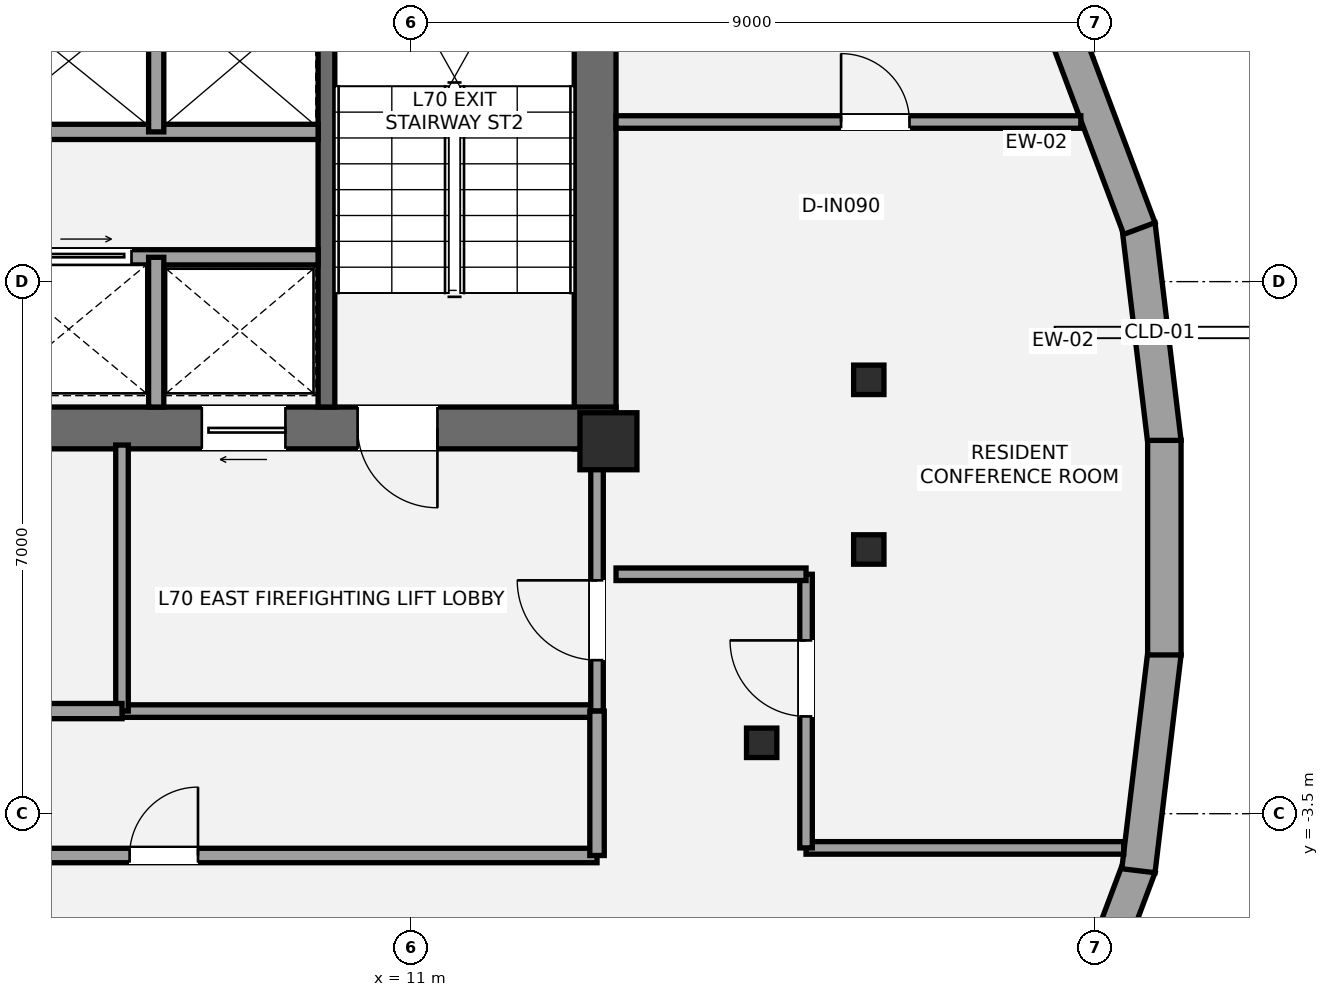
"""IFC4 building model, lengths in metres.
Left out: names, types, materials, properties, quantities, classifications, styles, units other than length and angle.
Written with IfcOpenShell. Run it as: python <this file> out.ifc"""

import sys

from ifc_helpers import new_model, si_unit, direction, frame, frame_2d, origin, origin_2d, place, context, subcontext, project, spatial, rectangle, i_section, extrude, element, fill, save


model = new_model("IFC4")
c1 = context("Model", 3, precision=1e-05, world=origin(), true_north=direction((0.0, 1.0)))
c2 = subcontext(c1, "Body", "Model", "MODEL_VIEW")
j1 = project(units=[si_unit("LENGTHUNIT", "METRE"), si_unit("PLANEANGLEUNIT", "RADIAN")], contexts=[c1])
p1 = place(None, origin())
s1 = spatial("IfcSite", under=j1, at=p1, CompositionType="ELEMENT")
p2 = place(p1, origin())
s2 = spatial("IfcBuilding", under=s1, at=p2, CompositionType="ELEMENT")
p3 = place(p2, frame((0.0, 0.0, 247.8)))
s3 = spatial("IfcBuildingStorey", under=s2, at=p3, CompositionType="ELEMENT", Elevation=247.8)
p4 = place(p3, frame((13.425, 1.3, 0.0), z_axis=(0.0, 0.0, 1.0), x_axis=(0.0, 1.0, 0.0)))
e1 = element("IfcWall", 1, at=p4, inside=s3, PredefinedType="SHEAR", context=c2, shape_type="SweptSolid", body=[
    extrude(rectangle(XDim=8.25, YDim=0.55, at=frame_2d((4.125, 0.0))), origin(), (0.0, 0.0, 1.0), 3.15),
])
p5 = place(p3, frame((13.7, 1.575, 0.0), z_axis=(0.0, 0.0, 1.0), x_axis=(-1.0, 0.0, 0.0)))
e2 = element("IfcWall", 2, at=p5, inside=s3, PredefinedType="SHEAR", context=c2, shape_type="SweptSolid", body=[
    extrude(rectangle(XDim=8.775, YDim=0.55, at=frame_2d((4.387, 0.0))), origin(), (0.0, 0.0, 1.0), 3.15),
])
p6 = place(p5, frame((2.35, 0.0, 0.0)))
e3 = element("IfcOpeningElement", 3, at=p6, cuts=e2, PredefinedType="OPENING", context=c2, shape_type="SweptSolid", body=[
    extrude(rectangle(XDim=1.05, YDim=2.15, at=frame_2d((0.525, 1.075))), frame((0.0, 0.285, 0.0), z_axis=(0.0, -1.0, 0.0), x_axis=(1.0, 0.0, 0.0)), (0.0, 0.0, 1.0), 0.57),
])
p7 = place(p5, frame((4.35, 0.0, 0.0)))
e4 = element("IfcOpeningElement", 4, at=p7, cuts=e2, PredefinedType="OPENING", context=c2, shape_type="SweptSolid", body=[
    extrude(rectangle(XDim=1.1, YDim=2.2, at=frame_2d((0.55, 1.1))), frame((0.0, 0.285, 0.0), z_axis=(0.0, -1.0, 0.0), x_axis=(1.0, 0.0, 0.0)), (0.0, 0.0, 1.0), 0.57),
])
p8 = place(p3, frame((9.89, 1.85, 0.0), z_axis=(0.0, 0.0, 1.0), x_axis=(0.0, 1.0, 0.0)))
e5 = element("IfcWall", 5, at=p8, inside=s3, PredefinedType="SHEAR", context=c2, shape_type="SweptSolid", body=[
    extrude(rectangle(XDim=7.15, YDim=0.22, at=frame_2d((3.575, 0.0))), origin(), (0.0, 0.0, 1.0), 3.15),
])
p9 = place(p3, frame((13.6, 1.4, 0.0), z_axis=(0.0, 0.0, 1.0), x_axis=(1.0, 0.0, 0.0)))
e6 = element("IfcColumn", 6, at=p9, inside=s3, PredefinedType="PILASTER", context=c2, shape_type="SweptSolid", body=[
    extrude(rectangle(XDim=0.75, YDim=0.75, at=origin_2d()), origin(), (0.0, 0.0, 1.0), 3.15),
])
for number, where, z_axis, x_axis in (
    (7, (17.026, 2.208, 0.0), (0.0, 0.0, 1.0), (1.0, 0.0, 0.0)),
    (8, (15.616, -2.567, 0.0), (0.0, 0.0, 1.0), (1.0, 0.0, 0.0)),
    (9, (17.026, -0.024, 0.0), (0.0, 0.0, 1.0), (1.0, 0.0, 0.0)),
):
    element("IfcColumn", number, at=place(p3, frame(where, z_axis=z_axis, x_axis=x_axis)), inside=s3, PredefinedType="COLUMN", context=c2, shape_type="SweptSolid", body=[
        extrude(i_section(OverallWidth=0.399, OverallDepth=0.387, WebThickness=0.021, FlangeThickness=0.033, at=origin_2d()), origin(), (0.0, 0.0, 1.0), 3.15),
    ])
p10 = place(p3, frame((20.573, 4.25, 0.0), z_axis=(0.0, 0.0, 1.0), x_axis=(0.118878304978, -0.992908831971, 0.0)))
e10 = element("IfcWall", 10, at=p10, inside=s3, PredefinedType="STANDARD", context=c2, shape_type="SweptSolid", body=[
    extrude(rectangle(XDim=2.885, YDim=0.44, at=frame_2d((1.443, 0.0))), origin(), (0.0, 0.0, 1.0), 2.336),
])
for number, where, z_axis, x_axis in (
    (11, (19.508, 7.067, 0.0), (0.0, 0.0, 1.0), (0.352, -0.936, 0.0)),
    (12, (20.586, -4.199, 0.0), (0.0, 0.0, 1.0), (-0.352, -0.936, 0.0)),
):
    element("IfcWall", number, at=place(p3, frame(where, z_axis=z_axis, x_axis=x_axis)), inside=s3, PredefinedType="STANDARD", context=c2, shape_type="SweptSolid", body=[
        extrude(rectangle(XDim=3.064, YDim=0.44, at=frame_2d((1.532, 0.0))), origin(), (0.0, 0.0, 1.0), 2.336),
    ])
p11 = place(p3, frame((20.916, -1.385, 0.0), z_axis=(0.0, 0.0, 1.0), x_axis=(-0.118878304978, -0.992908831971, 0.0)))
e13 = element("IfcWall", 13, at=p11, inside=s3, PredefinedType="STANDARD", context=c2, shape_type="SweptSolid", body=[
    extrude(rectangle(XDim=2.885, YDim=0.44, at=frame_2d((1.443, 0.0))), origin(), (0.0, 0.0, 1.0), 2.336),
])
p12 = place(p3, frame((20.914, 1.411, 0.0), z_axis=(0.0, 0.0, 1.0), x_axis=(0.0, -1.0, 0.0)))
e14 = element("IfcWall", 14, at=p12, inside=s3, PredefinedType="STANDARD", context=c2, shape_type="SweptSolid", body=[
    extrude(rectangle(XDim=2.823, YDim=0.44, at=frame_2d((1.411, 0.0))), origin(), (0.0, 0.0, 1.0), 2.336),
])
p13 = place(p3, frame((7.2, -2.15, 0.0), z_axis=(0.0, 0.0, 1.0), x_axis=(1.0, 0.0, 0.0)))
e15 = element("IfcWall", 15, at=p13, inside=s3, PredefinedType="PARTITIONING", context=c2, shape_type="SweptSolid", body=[
    extrude(rectangle(XDim=6.25, YDim=0.165, at=frame_2d((3.125, 0.0))), origin(), (0.0, 0.0, 1.0), 2.97),
])
p14 = place(p3, frame((7.2, -2.15, 0.0), z_axis=(0.0, 0.0, 1.0), x_axis=(0.0, 1.0, 0.0)))
e16 = element("IfcWall", 16, at=p14, inside=s3, PredefinedType="PARTITIONING", context=c2, shape_type="SweptSolid", body=[
    extrude(rectangle(XDim=3.5, YDim=0.165, at=frame_2d((1.75, 0.0))), origin(), (0.0, 0.0, 1.0), 2.423),
])
p15 = place(p3, frame((13.45, -2.15, 0.0), z_axis=(0.0, 0.0, 1.0), x_axis=(0.0, 1.0, 0.0)))
e17 = element("IfcWall", 17, at=p15, inside=s3, PredefinedType="PARTITIONING", context=c2, shape_type="SweptSolid", body=[
    extrude(rectangle(XDim=3.5, YDim=0.165, at=frame_2d((1.75, 0.0))), origin(), (0.0, 0.0, 1.0), 2.423),
])
p16 = place(p15, frame((0.67, 0.0, 0.0)))
e18 = element("IfcOpeningElement", 18, at=p16, cuts=e17, PredefinedType="OPENING", context=c2, shape_type="SweptSolid", body=[
    extrude(rectangle(XDim=1.05, YDim=2.15, at=frame_2d((0.525, 1.075))), frame((0.0, 0.093, 0.0), z_axis=(0.0, -1.0, 0.0), x_axis=(1.0, 0.0, 0.0)), (0.0, 0.0, 1.0), 0.185),
])
p17 = place(p3, frame((4.95, -2.15, 0.0), z_axis=(0.0, 0.0, 1.0), x_axis=(1.0, 0.0, 0.0)))
e19 = element("IfcWall", 19, at=p17, inside=s3, PredefinedType="SOLIDWALL", context=c2, shape_type="SweptSolid", body=[
    extrude(rectangle(XDim=2.25, YDim=0.2, at=frame_2d((1.125, 0.0))), origin(), (0.0, 0.0, 1.0), 2.97),
])
p18 = place(p3, frame((5.475, 3.82, 0.0), z_axis=(0.0, 0.0, 1.0), x_axis=(1.0, 0.0, 0.0)))
e20 = element("IfcWall", 20, at=p18, inside=s3, PredefinedType="SOLIDWALL", context=c2, shape_type="SweptSolid", body=[
    extrude(rectangle(XDim=4.305, YDim=0.2, at=frame_2d((2.152, 0.0))), origin(), (0.0, 0.0, 1.0), 2.97),
])
p19 = place(p18, frame((0.65, 0.0, 0.0)))
e21 = element("IfcOpeningElement", 21, at=p19, cuts=e20, PredefinedType="OPENING", context=c2, shape_type="SweptSolid", body=[
    extrude(rectangle(XDim=1.2, YDim=2.2, at=frame_2d((0.6, 1.1))), frame((0.0, 0.11, 0.0), z_axis=(0.0, -1.0, 0.0), x_axis=(1.0, 0.0, 0.0)), (0.0, 0.0, 1.0), 0.22),
])
p20 = place(p3, frame((7.65, 1.85, 0.0), z_axis=(0.0, 0.0, 1.0), x_axis=(0.0, 1.0, 0.0)))
e22 = element("IfcWall", 22, at=p20, inside=s3, PredefinedType="SOLIDWALL", context=c2, shape_type="SweptSolid", body=[
    extrude(rectangle(XDim=1.97, YDim=0.2, at=frame_2d((0.985, 0.0))), origin(), (0.0, 0.0, 1.0), 2.97),
])
p21 = place(p3, frame((5.475, 5.47, 0.0), z_axis=(0.0, 0.0, 1.0), x_axis=(1.0, 0.0, 0.0)))
e23 = element("IfcWall", 23, at=p21, inside=s3, PredefinedType="SOLIDWALL", context=c2, shape_type="SweptSolid", body=[
    extrude(rectangle(XDim=4.305, YDim=0.2, at=frame_2d((2.152, 0.0))), origin(), (0.0, 0.0, 1.0), 2.97),
])
p22 = place(p3, frame((7.65, 5.47, 0.0), z_axis=(0.0, 0.0, 1.0), x_axis=(0.0, 1.0, 0.0)))
e24 = element("IfcWall", 24, at=p22, inside=s3, PredefinedType="SOLIDWALL", context=c2, shape_type="SweptSolid", body=[
    extrude(rectangle(XDim=1.86, YDim=0.2, at=frame_2d((0.93, 0.0))), origin(), (0.0, 0.0, 1.0), 2.97),
])
p23 = place(p3, frame((2.1, -4.05, 0.0), z_axis=(0.0, 0.0, 1.0), x_axis=(1.0, 0.0, 0.0)))
e25 = element("IfcWall", 25, at=p23, inside=s3, PredefinedType="PLUMBINGWALL", context=c2, shape_type="SweptSolid", body=[
    extrude(rectangle(XDim=11.35, YDim=0.19, at=frame_2d((5.675, 0.0))), origin(), (0.0, 0.0, 1.0), 2.357),
])
p24 = place(p23, frame((5.2, 0.0, 0.0)))
e26 = element("IfcOpeningElement", 26, at=p24, cuts=e25, PredefinedType="OPENING", context=c2, shape_type="SweptSolid", body=[
    extrude(rectangle(XDim=0.9, YDim=2.1, at=frame_2d((0.45, 1.05))), frame((0.0, 0.105, 0.0), z_axis=(0.0, -1.0, 0.0), x_axis=(1.0, 0.0, 0.0)), (0.0, 0.0, 1.0), 0.21),
])
p25 = place(p3, frame((13.45, -4.05, 0.0), z_axis=(0.0, 0.0, 1.0), x_axis=(0.0, 1.0, 0.0)))
e27 = element("IfcWall", 27, at=p25, inside=s3, PredefinedType="PLUMBINGWALL", context=c2, shape_type="SweptSolid", body=[
    extrude(rectangle(XDim=1.9, YDim=0.19, at=frame_2d((0.95, 0.0))), origin(), (0.0, 0.0, 1.0), 2.423),
])
p26 = place(p3, frame((16.2, -3.95, 0.0), z_axis=(0.0, 0.0, 1.0), x_axis=(1.0, 0.0, 0.0)))
e28 = element("IfcWall", 28, at=p26, inside=s3, PredefinedType="PARTITIONING", context=c2, shape_type="SweptSolid", body=[
    extrude(rectangle(XDim=4.179, YDim=0.165, at=frame_2d((2.09, 0.0))), origin(), (0.0, 0.0, 1.0), 2.423),
])
p27 = place(p3, frame((16.2, -3.95, 0.0), z_axis=(0.0, 0.0, 1.0), x_axis=(0.0, 1.0, 0.0)))
e29 = element("IfcWall", 29, at=p27, inside=s3, PredefinedType="PARTITIONING", context=c2, shape_type="SweptSolid", body=[
    extrude(rectangle(XDim=3.6, YDim=0.165, at=frame_2d((1.8, 0.0))), origin(), (0.0, 0.0, 1.0), 2.357),
])
p28 = place(p27, frame((1.73, 0.0, 0.0)))
e30 = element("IfcOpeningElement", 30, at=p28, cuts=e29, PredefinedType="OPENING", context=c2, shape_type="SweptSolid", body=[
    extrude(rectangle(XDim=1.0, YDim=2.15, at=frame_2d((0.5, 1.075))), frame((0.0, 0.093, 0.0), z_axis=(0.0, -1.0, 0.0), x_axis=(1.0, 0.0, 0.0)), (0.0, 0.0, 1.0), 0.185),
])
p29 = place(p3, frame((13.7, -0.35, 0.0), z_axis=(0.0, 0.0, 1.0), x_axis=(1.0, 0.0, 0.0)))
e31 = element("IfcWall", 31, at=p29, inside=s3, PredefinedType="PARTITIONING", context=c2, shape_type="SweptSolid", body=[
    extrude(rectangle(XDim=2.5, YDim=0.165, at=frame_2d((1.25, 0.0))), origin(), (0.0, 0.0, 1.0), 2.423),
])
p30 = place(p3, frame((13.7, 5.6, 0.0), z_axis=(0.0, 0.0, 1.0), x_axis=(1.0, 0.0, 0.0)))
e32 = element("IfcWall", 32, at=p30, inside=s3, PredefinedType="PARTITIONING", context=c2, shape_type="SweptSolid", body=[
    extrude(rectangle(XDim=6.115, YDim=0.165, at=frame_2d((3.058, 0.0))), origin(), (0.0, 0.0, 1.0), 2.423),
])
p31 = place(p30, frame((2.961, 0.0, 0.0)))
e33 = element("IfcOpeningElement", 33, at=p31, cuts=e32, PredefinedType="OPENING", context=c2, shape_type="SweptSolid", body=[
    extrude(rectangle(XDim=0.9, YDim=2.1, at=frame_2d((0.45, 1.05))), frame((0.0, 0.093, 0.0), z_axis=(0.0, -1.0, 0.0), x_axis=(1.0, 0.0, 0.0)), (0.0, 0.0, 1.0), 0.185),
])
p32 = place(p6, origin())
e34 = element("IfcDoor", 34, at=p32, inside=s3, OperationType="SINGLE_SWING_LEFT", PredefinedType="DOOR", context=c2, shape_type="SweptSolid", body=[
    extrude(rectangle(XDim=1.05, YDim=2.15, at=frame_2d((0.525, 1.075))), frame((0.0, 0.025, 0.0), z_axis=(0.0, -1.0, 0.0), x_axis=(1.0, 0.0, 0.0)), (0.0, 0.0, 1.0), 0.05),
])
fill(e3, e34)
p33 = place(p16, origin())
e35 = element("IfcDoor", 35, at=p33, inside=s3, OperationType="SINGLE_SWING_RIGHT", PredefinedType="DOOR", context=c2, shape_type="SweptSolid", body=[
    extrude(rectangle(XDim=1.05, YDim=2.15, at=frame_2d((0.525, 1.075))), frame((0.0, 0.025, 0.0), z_axis=(0.0, -1.0, 0.0), x_axis=(1.0, 0.0, 0.0)), (0.0, 0.0, 1.0), 0.05),
])
fill(e18, e35)
p34 = place(p7, origin())
e36 = element("IfcDoor", 36, at=p34, inside=s3, OperationType="SLIDING_TO_LEFT", PredefinedType="DOOR", context=c2, shape_type="SweptSolid", body=[
    extrude(rectangle(XDim=1.1, YDim=2.2, at=frame_2d((0.55, 1.1))), frame((0.0, 0.025, 0.0), z_axis=(0.0, -1.0, 0.0), x_axis=(1.0, 0.0, 0.0)), (0.0, 0.0, 1.0), 0.05),
])
fill(e4, e36)
p35 = place(p19, origin())
e37 = element("IfcDoor", 37, at=p35, inside=s3, OperationType="SLIDING_TO_RIGHT", PredefinedType="DOOR", context=c2, shape_type="SweptSolid", body=[
    extrude(rectangle(XDim=1.2, YDim=2.2, at=frame_2d((0.6, 1.1))), frame((0.0, 0.025, 0.0), z_axis=(0.0, -1.0, 0.0), x_axis=(1.0, 0.0, 0.0)), (0.0, 0.0, 1.0), 0.05),
])
fill(e21, e37)
p36 = place(p24, origin())
e38 = element("IfcDoor", 38, at=p36, inside=s3, OperationType="SINGLE_SWING_RIGHT", PredefinedType="DOOR", context=c2, shape_type="SweptSolid", body=[
    extrude(rectangle(XDim=0.9, YDim=2.1, at=frame_2d((0.45, 1.05))), frame((0.0, 0.025, 0.0), z_axis=(0.0, -1.0, 0.0), x_axis=(1.0, 0.0, 0.0)), (0.0, 0.0, 1.0), 0.05),
])
fill(e26, e38)
p37 = place(p28, origin())
e39 = element("IfcDoor", 39, at=p37, inside=s3, OperationType="SINGLE_SWING_RIGHT", PredefinedType="DOOR", context=c2, shape_type="SweptSolid", body=[
    extrude(rectangle(XDim=1.0, YDim=2.15, at=frame_2d((0.5, 1.075))), frame((0.0, 0.025, 0.0), z_axis=(0.0, -1.0, 0.0), x_axis=(1.0, 0.0, 0.0)), (0.0, 0.0, 1.0), 0.05),
])
fill(e30, e39)
p38 = place(p31, origin())
e40 = element("IfcDoor", 40, at=p38, inside=s3, OperationType="SINGLE_SWING_LEFT", PredefinedType="DOOR", context=c2, shape_type="SweptSolid", body=[
    extrude(rectangle(XDim=0.9, YDim=2.1, at=frame_2d((0.45, 1.05))), frame((0.0, 0.025, 0.0), z_axis=(0.0, -1.0, 0.0), x_axis=(1.0, 0.0, 0.0)), (0.0, 0.0, 1.0), 0.05),
])
fill(e33, e40)
save(model, sys.argv[1])
